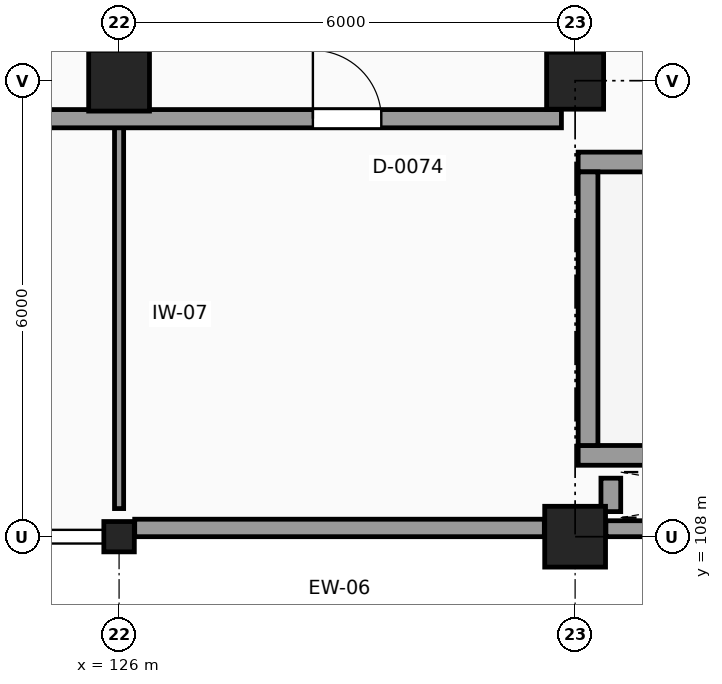
"""IFC4 building model, lengths in metres.
Left out: names, types, materials, properties, quantities, classifications, styles, units other than length and angle.
Written with IfcOpenShell. Run it as: python <this file> out.ifc"""

import sys

from ifc_helpers import new_model, si_unit, direction, frame, frame_2d, origin, origin_2d, place, context, subcontext, project, spatial, rectangle, i_section, extrude, element, fill, save


model = new_model("IFC4")
c1 = context("Model", 3, precision=1e-05, world=origin(), true_north=direction((0.0, 1.0)))
c2 = subcontext(c1, "Body", "Model", "MODEL_VIEW")
j1 = project(units=[si_unit("LENGTHUNIT", "METRE"), si_unit("PLANEANGLEUNIT", "RADIAN")], contexts=[c1])
p1 = place(None, origin())
s1 = spatial("IfcSite", under=j1, at=p1, CompositionType="ELEMENT")
p2 = place(p1, origin())
s2 = spatial("IfcBuilding", under=s1, at=p2, CompositionType="ELEMENT")
p3 = place(p2, frame((0.0, 0.0, 6.0)))
s3 = spatial("IfcBuildingStorey", under=s2, at=p3, CompositionType="ELEMENT", Elevation=6.0)
p4 = place(p3, frame((126.0, 108.0, 0.0), z_axis=(0.0, 0.0, 1.0), x_axis=(1.0, 0.0, 0.0)))
e1 = element("IfcColumn", 1, at=p4, inside=s3, PredefinedType="COLUMN", context=c2, shape_type="SweptSolid", body=[
    extrude(i_section(OverallWidth=0.401, OverallDepth=0.399, WebThickness=0.019, FlangeThickness=0.03, FilletRadius=0.015, at=origin_2d()), origin(), (0.0, 0.0, 1.0), 4.5),
])
for number, where, z_axis, x_axis in (
    (2, (126.0, 114.0, 0.0), (0.0, 0.0, 1.0), (1.0, 0.0, 0.0)),
    (3, (132.0, 108.0, 0.0), (0.0, 0.0, 1.0), (1.0, 0.0, 0.0)),
):
    element("IfcColumn", number, at=place(p3, frame(where, z_axis=z_axis, x_axis=x_axis)), inside=s3, PredefinedType="COLUMN", context=c2, shape_type="SweptSolid", body=[
        extrude(rectangle(XDim=0.8, YDim=0.8, at=origin_2d()), origin(), (0.0, 0.0, 1.0), 4.5),
    ])
p5 = place(p3, frame((132.0, 114.0, 0.0), z_axis=(0.0, 0.0, 1.0), x_axis=(1.0, 0.0, 0.0)))
e4 = element("IfcColumn", 4, at=p5, inside=s3, PredefinedType="COLUMN", context=c2, shape_type="SweptSolid", body=[
    extrude(rectangle(XDim=0.75, YDim=0.75, at=origin_2d()), origin(), (0.0, 0.0, 1.0), 4.5),
])
p6 = place(p3, frame((126.206, 108.115, 0.0), z_axis=(0.0, 0.0, 1.0), x_axis=(1.0, 0.0, 0.0)))
e5 = element("IfcWall", 5, at=p6, inside=s3, PredefinedType="SOLIDWALL", context=c2, shape_type="SweptSolid", body=[
    extrude(rectangle(XDim=5.389, YDim=0.23, at=frame_2d((2.695, 0.0))), origin(), (0.0, 0.0, 1.0), 3.47),
])
p7 = place(p3, frame((132.405, 108.105, 0.0), z_axis=(0.0, 0.0, 1.0), x_axis=(1.0, 0.0, 0.0)))
e6 = element("IfcWall", 6, at=p7, inside=s3, PredefinedType="SOLIDWALL", context=c2, shape_type="SweptSolid", body=[
    extrude(rectangle(XDim=5.215, YDim=0.21, at=frame_2d((2.607, 0.0))), origin(), (0.0, 0.0, 1.0), 4.22),
])
for number, where, z_axis, x_axis in (
    (7, (132.04, 109.07, 0.0), (0.0, 0.0, 1.0), (1.0, 0.0, 0.0)),
    (8, (132.04, 112.93, 0.0), (0.0, 0.0, 1.0), (1.0, 0.0, 0.0)),
):
    element("IfcWall", number, at=place(p3, frame(where, z_axis=z_axis, x_axis=x_axis)), inside=s3, PredefinedType="SHEAR", context=c2, shape_type="SweptSolid", body=[
        extrude(rectangle(XDim=10.72, YDim=0.26, at=frame_2d((5.36, 0.0))), origin(), (0.0, 0.0, 1.0), 4.5),
    ])
p8 = place(p3, frame((132.17, 109.2, 0.0), z_axis=(0.0, 0.0, 1.0), x_axis=(0.0, 1.0, 0.0)))
e9 = element("IfcWall", 9, at=p8, inside=s3, PredefinedType="SHEAR", context=c2, shape_type="SweptSolid", body=[
    extrude(rectangle(XDim=3.6, YDim=0.26, at=frame_2d((1.8, 0.0))), origin(), (0.0, 0.0, 1.0), 4.5),
])
p9 = place(p3, frame((132.47, 108.33, 0.0), z_axis=(0.0, 0.0, 1.0), x_axis=(0.0, 1.0, 0.0)))
e10 = element("IfcWall", 10, at=p9, inside=s3, PredefinedType="SHEAR", context=c2, shape_type="SweptSolid", body=[
    extrude(rectangle(XDim=0.44, YDim=0.26, at=frame_2d((0.22, 0.0))), origin(), (0.0, 0.0, 1.0), 4.5),
])
p10 = place(p3, frame((126.0, 108.37, 0.0), z_axis=(0.0, 0.0, 1.0), x_axis=(0.0, 1.0, 0.0)))
e11 = element("IfcWall", 11, at=p10, inside=s3, PredefinedType="PARTITIONING", context=c2, shape_type="SweptSolid", body=[
    extrude(rectangle(XDim=5.13, YDim=0.12, at=frame_2d((2.565, 0.0))), origin(), (0.0, 0.0, 1.0), 3.42),
])
p11 = place(p3, frame((120.555, 113.5, 0.0), z_axis=(0.0, 0.0, 1.0), x_axis=(1.0, 0.0, 0.0)))
e12 = element("IfcWall", 12, at=p11, inside=s3, PredefinedType="PARTITIONING", context=c2, shape_type="SweptSolid", body=[
    extrude(rectangle(XDim=11.265, YDim=0.24, at=frame_2d((5.633, 0.0))), origin(), (0.0, 0.0, 1.0), 4.22),
])
p12 = place(p11, frame((1.995, 0.0, 0.0)))
e13 = element("IfcOpeningElement", 13, at=p12, cuts=e12, PredefinedType="OPENING", context=c2, shape_type="SweptSolid", body=[
    extrude(rectangle(XDim=0.9, YDim=2.1, at=frame_2d((0.45, 1.05))), frame((0.0, 0.13, 0.0), z_axis=(0.0, -1.0, 0.0), x_axis=(1.0, 0.0, 0.0)), (0.0, 0.0, 1.0), 0.26),
])
p13 = place(p11, frame((7.995, 0.0, 0.0)))
e14 = element("IfcOpeningElement", 14, at=p13, cuts=e12, PredefinedType="OPENING", context=c2, shape_type="SweptSolid", body=[
    extrude(rectangle(XDim=0.9, YDim=2.1, at=frame_2d((0.45, 1.05))), frame((0.0, 0.13, 0.0), z_axis=(0.0, -1.0, 0.0), x_axis=(1.0, 0.0, 0.0)), (0.0, 0.0, 1.0), 0.26),
])
p14 = place(p13, origin())
e15 = element("IfcDoor", 15, at=p14, inside=s3, OperationType="SINGLE_SWING_LEFT", PredefinedType="DOOR", context=c2, shape_type="SweptSolid", body=[
    extrude(rectangle(XDim=0.9, YDim=2.1, at=frame_2d((0.45, 1.05))), frame((0.0, 0.025, 0.0), z_axis=(0.0, -1.0, 0.0), x_axis=(1.0, 0.0, 0.0)), (0.0, 0.0, 1.0), 0.05),
])
fill(e14, e15)
save(model, sys.argv[1])
